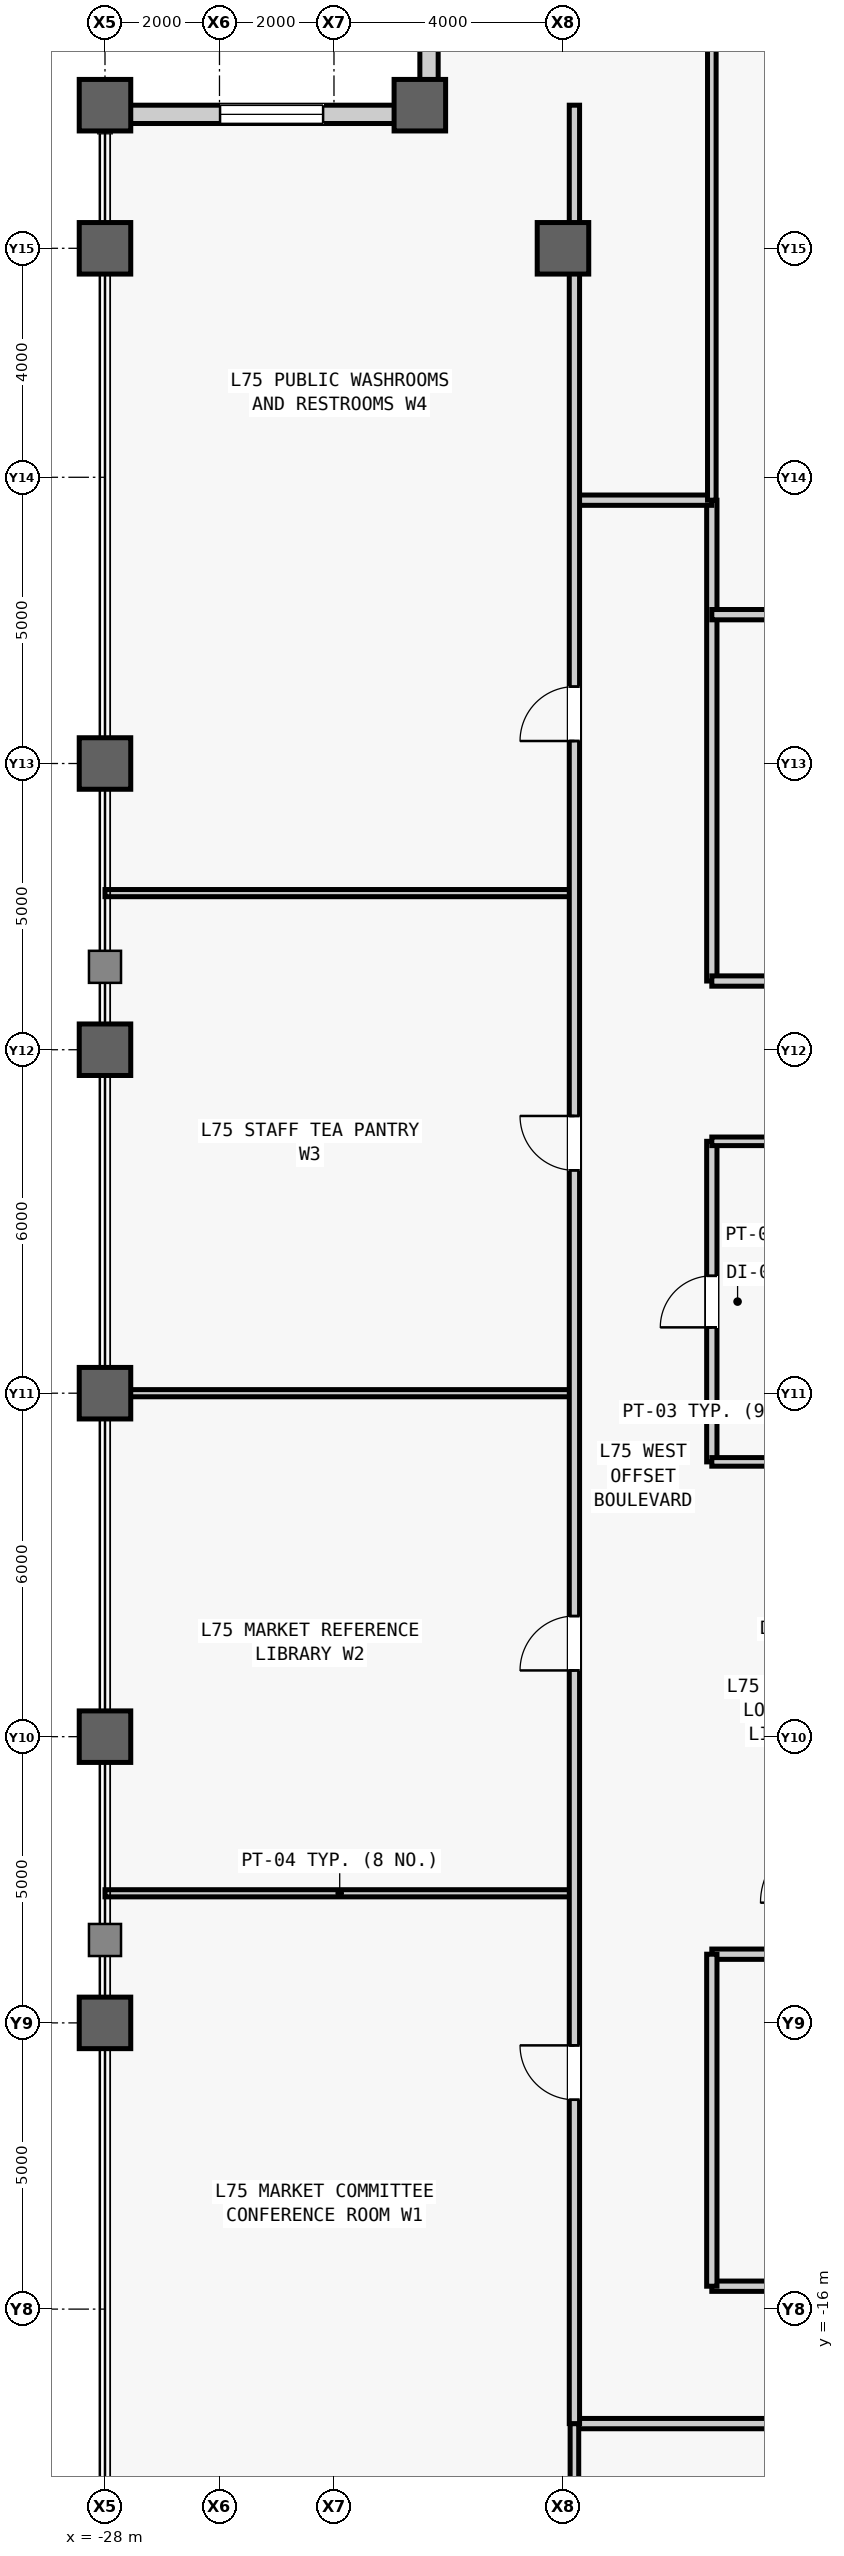
"""IFC4 building model, lengths in metres.
Left out: names, types, materials, properties, quantities, classifications, styles, units other than length and angle.
Written with IfcOpenShell. Run it as: python <this file> out.ifc"""

import sys

from ifc_helpers import new_model, si_unit, direction, frame, frame_2d, origin, origin_2d, place, context, subcontext, project, spatial, rectangle, hollow_rectangle, extrude, source, transform, mapped, element, fill, save


model = new_model("IFC4")
c1 = context("Model", 3, precision=1e-05, world=origin(), true_north=direction((0.0, 1.0)))
c2 = subcontext(c1, "Body", "Model", "MODEL_VIEW")
j1 = project(units=[si_unit("LENGTHUNIT", "METRE"), si_unit("PLANEANGLEUNIT", "RADIAN")], contexts=[c1])
p1 = place(None, origin())
s1 = spatial("IfcSite", under=j1, at=p1, CompositionType="ELEMENT")
p2 = place(p1, origin())
s2 = spatial("IfcBuilding", under=s1, at=p2, CompositionType="ELEMENT")
p3 = place(p2, frame((0.0, 0.0, 317.5)))
s3 = spatial("IfcBuildingStorey", under=s2, at=p3, CompositionType="ELEMENT", Elevation=317.5)
m1 = source(origin(), c2, "Body", "SweptSolid", [
    extrude(hollow_rectangle(XDim=0.9, YDim=0.9, WallThickness=0.05, at=origin_2d()), origin(), (0.0, 0.0, 1.0), 4.0),
])
for number, where, z_axis, x_axis in (
    (1, (-28.0, -11.0, 0.0), (0.0, 0.0, 1.0), (1.0, 0.0, 0.0)),
    (2, (-28.0, -6.0, 0.0), (0.0, 0.0, 1.0), (1.0, 0.0, 0.0)),
    (3, (-28.0, 0.0, 0.0), (0.0, 0.0, 1.0), (1.0, 0.0, 0.0)),
    (4, (-28.0, 6.0, 0.0), (0.0, 0.0, 1.0), (1.0, 0.0, 0.0)),
    (5, (-28.0, 11.0, 0.0), (0.0, 0.0, 1.0), (1.0, 0.0, 0.0)),
    (6, (-28.0, 20.0, 0.0), (0.0, 0.0, 1.0), (1.0, 0.0, 0.0)),
    (7, (-28.0, 22.5, 0.0), (0.0, 0.0, 1.0), (1.0, 0.0, 0.0)),
    (8, (-22.5, 22.5, 0.0), (0.0, 0.0, 1.0), (1.0, 0.0, 0.0)),
    (9, (-20.0, 20.0, 0.0), (0.0, 0.0, 1.0), (1.0, 0.0, 0.0)),
):
    element("IfcColumn", number, at=place(p3, frame(where, z_axis=z_axis, x_axis=x_axis)), inside=s3, PredefinedType="COLUMN", context=c2, shape_type="MappedRepresentation", body=[
        mapped(m1, transform((0.0, 0.0, 0.0), scale=1.0)),
    ])
m2 = source(origin(), c2, "Body", "SweptSolid", [
    extrude(rectangle(XDim=5.18, YDim=0.32, at=frame_2d((2.59, 0.0))), origin(), (0.0, 0.0, 1.0), 3.231),
])
p4 = place(p3, frame((-22.34, 22.5, 0.0), z_axis=(0.0, 0.0, 1.0), x_axis=(0.0, 1.0, 0.0)))
e10 = element("IfcWall", 10, at=p4, inside=s3, PredefinedType="STANDARD", context=c2, shape_type="MappedRepresentation", body=[
    mapped(m2, transform((0.0, 0.0, 0.0), scale=1.0)),
])
m3 = source(origin(), c2, "Body", "SweptSolid", [
    extrude(rectangle(XDim=1.8, YDim=2.4, at=frame_2d((0.9, 1.2))), frame((0.0, 0.17, 0.0), z_axis=(0.0, -1.0, 0.0), x_axis=(1.0, 0.0, 0.0)), (0.0, 0.0, 1.0), 0.34),
])
p5 = place(p4, frame((1.69, 0.0, 0.5)))
e11 = element("IfcOpeningElement", 11, at=p5, cuts=e10, PredefinedType="OPENING", context=c2, shape_type="MappedRepresentation", body=[
    mapped(m3, transform((0.0, 0.0, 0.0), scale=1.0)),
])
p6 = place(p3, frame((-22.5, 22.34, 0.0), z_axis=(0.0, 0.0, 1.0), x_axis=(-1.0, 0.0, 0.0)))
e12 = element("IfcWall", 12, at=p6, inside=s3, PredefinedType="STANDARD", context=c2, shape_type="MappedRepresentation", body=[
    mapped(m2, transform((0.0, 0.0, 0.0), scale=1.0)),
])
p7 = place(p6, frame((1.69, 0.0, 0.5)))
e13 = element("IfcOpeningElement", 13, at=p7, cuts=e12, PredefinedType="OPENING", context=c2, shape_type="MappedRepresentation", body=[
    mapped(m3, transform((0.0, 0.0, 0.0), scale=1.0)),
])
m4 = source(origin(), c2, "Body", "SweptSolid", [
    extrude(rectangle(XDim=5.6, YDim=0.18, at=frame_2d((2.8, 0.0))), origin(), (0.0, 0.0, 1.0), 3.78),
])
p8 = place(p3, frame((-17.4, -1.2, 0.0), z_axis=(0.0, 0.0, 1.0), x_axis=(0.0, 1.0, 0.0)))
e14 = element("IfcWall", 14, at=p8, inside=s3, PredefinedType="PARTITIONING", context=c2, shape_type="MappedRepresentation", body=[
    mapped(m4, transform((0.0, 0.0, 0.0), scale=1.0)),
])
m5 = source(origin(), c2, "Body", "SweptSolid", [
    extrude(rectangle(XDim=0.9, YDim=2.15, at=frame_2d((0.45, 1.075))), frame((0.0, 0.1, 0.0), z_axis=(0.0, -1.0, 0.0), x_axis=(1.0, 0.0, 0.0)), (0.0, 0.0, 1.0), 0.2),
])
p9 = place(p8, frame((2.35, 0.0, 0.0)))
e15 = element("IfcOpeningElement", 15, at=p9, cuts=e14, PredefinedType="OPENING", context=c2, shape_type="MappedRepresentation", body=[
    mapped(m5, transform((0.0, 0.0, 0.0), scale=1.0)),
])
m6 = source(origin(), c2, "Body", "SweptSolid", [
    extrude(rectangle(XDim=2.05, YDim=0.15, at=frame_2d((1.025, 0.0))), origin(), (0.0, 0.0, 1.0), 3.78),
])
for number, where, z_axis, x_axis in (
    (16, (-17.4, -1.2, 0.0), (0.0, 0.0, 1.0), (1.0, 0.0, 0.0)),
    (17, (-17.4, 4.4, 0.0), (0.0, 0.0, 1.0), (1.0, 0.0, 0.0)),
):
    element("IfcWall", number, at=place(p3, frame(where, z_axis=z_axis, x_axis=x_axis)), inside=s3, PredefinedType="PARTITIONING", context=c2, shape_type="MappedRepresentation", body=[
        mapped(m6, transform((0.0, 0.0, 0.0), scale=1.0)),
    ])
m7 = source(origin(), c2, "Body", "SweptSolid", [
    extrude(rectangle(XDim=2.05, YDim=0.18, at=frame_2d((1.025, 0.0))), origin(), (0.0, 0.0, 1.0), 3.78),
])
p10 = place(p3, frame((-17.4, -9.8, 0.0), z_axis=(0.0, 0.0, 1.0), x_axis=(1.0, 0.0, 0.0)))
e18 = element("IfcWall", 18, at=p10, inside=s3, PredefinedType="PARTITIONING", context=c2, shape_type="MappedRepresentation", body=[
    mapped(m7, transform((0.0, 0.0, 0.0), scale=1.0)),
])
m8 = source(origin(), c2, "Body", "SweptSolid", [
    extrude(rectangle(XDim=8.4, YDim=0.18, at=frame_2d((4.2, 0.0))), origin(), (0.0, 0.0, 1.0), 3.78),
])
p11 = place(p3, frame((-17.4, 7.2, 0.0), z_axis=(0.0, 0.0, 1.0), x_axis=(0.0, 1.0, 0.0)))
e19 = element("IfcWall", 19, at=p11, inside=s3, PredefinedType="PARTITIONING", context=c2, shape_type="MappedRepresentation", body=[
    mapped(m8, transform((0.0, 0.0, 0.0), scale=1.0)),
])
p12 = place(p3, frame((-17.4, 7.2, 0.0), z_axis=(0.0, 0.0, 1.0), x_axis=(1.0, 0.0, 0.0)))
e20 = element("IfcWall", 20, at=p12, inside=s3, PredefinedType="PARTITIONING", context=c2, shape_type="MappedRepresentation", body=[
    mapped(m7, transform((0.0, 0.0, 0.0), scale=1.0)),
])
m9 = source(origin(), c2, "Body", "SweptSolid", [
    extrude(rectangle(XDim=16.1, YDim=0.18, at=frame_2d((8.05, 0.0))), origin(), (0.0, 0.0, 1.0), 3.78),
])
p13 = place(p3, frame((-17.4, -15.6, 0.0), z_axis=(0.0, 0.0, 1.0), x_axis=(1.0, 0.0, 0.0)))
e21 = element("IfcWall", 21, at=p13, inside=s3, PredefinedType="PARTITIONING", context=c2, shape_type="MappedRepresentation", body=[
    mapped(m9, transform((0.0, 0.0, 0.0), scale=1.0)),
])
p14 = place(p13, frame((8.95, 0.0, 0.0)))
e22 = element("IfcOpeningElement", 22, at=p14, cuts=e21, PredefinedType="OPENING", context=c2, shape_type="MappedRepresentation", body=[
    mapped(m5, transform((0.0, 0.0, 0.0), scale=1.0)),
])
m10 = source(origin(), c2, "Body", "SweptSolid", [
    extrude(rectangle(XDim=5.8, YDim=0.18, at=frame_2d((2.9, 0.0))), origin(), (0.0, 0.0, 1.0), 3.78),
])
p15 = place(p3, frame((-17.4, -15.6, 0.0), z_axis=(0.0, 0.0, 1.0), x_axis=(0.0, 1.0, 0.0)))
e23 = element("IfcWall", 23, at=p15, inside=s3, PredefinedType="PARTITIONING", context=c2, shape_type="MappedRepresentation", body=[
    mapped(m10, transform((0.0, 0.0, 0.0), scale=1.0)),
])
m11 = source(origin(), c2, "Body", "SweptSolid", [
    extrude(rectangle(XDim=2.4, YDim=0.18, at=frame_2d((1.2, 0.0))), origin(), (0.0, 0.0, 1.0), 3.78),
])
p16 = place(p3, frame((-19.8, 15.6, 0.0), z_axis=(0.0, 0.0, 1.0), x_axis=(1.0, 0.0, 0.0)))
e24 = element("IfcWall", 24, at=p16, inside=s3, PredefinedType="PARTITIONING", context=c2, shape_type="MappedRepresentation", body=[
    mapped(m11, transform((0.0, 0.0, 0.0), scale=1.0)),
])
m12 = source(origin(), c2, "Body", "SweptSolid", [
    extrude(rectangle(XDim=37.55, YDim=0.18, at=frame_2d((18.775, 0.0))), origin(), (0.0, 0.0, 1.0), 3.78),
])
p17 = place(p3, frame((-19.8, -18.0, 0.0), z_axis=(0.0, 0.0, 1.0), x_axis=(1.0, 0.0, 0.0)))
e25 = element("IfcWall", 25, at=p17, inside=s3, PredefinedType="PARTITIONING", context=c2, shape_type="MappedRepresentation", body=[
    mapped(m12, transform((0.0, 0.0, 0.0), scale=1.0)),
])
m13 = source(origin(), c2, "Body", "SweptSolid", [
    extrude(rectangle(XDim=1.05, YDim=2.2, at=frame_2d((0.525, 1.1))), frame((0.0, 0.1, 0.0), z_axis=(0.0, -1.0, 0.0), x_axis=(1.0, 0.0, 0.0)), (0.0, 0.0, 1.0), 0.2),
])
p18 = place(p17, frame((5.983, 0.0, 0.0)))
e26 = element("IfcOpeningElement", 26, at=p18, cuts=e25, PredefinedType="OPENING", context=c2, shape_type="MappedRepresentation", body=[
    mapped(m13, transform((0.0, 0.0, 0.0), scale=1.0)),
])
p19 = place(p17, frame((17.875, 0.0, 0.0)))
e27 = element("IfcOpeningElement", 27, at=p19, cuts=e25, PredefinedType="OPENING", context=c2, shape_type="MappedRepresentation", body=[
    mapped(m13, transform((0.0, 0.0, 0.0), scale=1.0)),
])
p20 = place(p17, frame((30.116, 0.0, 0.0)))
e28 = element("IfcOpeningElement", 28, at=p20, cuts=e25, PredefinedType="OPENING", context=c2, shape_type="MappedRepresentation", body=[
    mapped(m13, transform((0.0, 0.0, 0.0), scale=1.0)),
])
m14 = source(origin(), c2, "Body", "SweptSolid", [
    extrude(rectangle(XDim=10.0, YDim=0.15, at=frame_2d((5.0, 0.0))), origin(), (0.0, 0.0, 1.0), 3.164),
])
p21 = place(p3, frame((-19.8, -28.0, 0.0), z_axis=(0.0, 0.0, 1.0), x_axis=(0.0, 1.0, 0.0)))
e29 = element("IfcWall", 29, at=p21, inside=s3, PredefinedType="PARTITIONING", context=c2, shape_type="MappedRepresentation", body=[
    mapped(m14, transform((0.0, 0.0, 0.0), scale=1.0)),
])
m15 = source(origin(), c2, "Body", "SweptSolid", [
    extrude(rectangle(XDim=32.75, YDim=0.18, at=frame_2d((16.375, 0.0))), origin(), (0.0, 0.0, 1.0), 3.78),
])
p22 = place(p3, frame((-17.4, 13.6, 0.0), z_axis=(0.0, 0.0, 1.0), x_axis=(1.0, 0.0, 0.0)))
e30 = element("IfcWall", 30, at=p22, inside=s3, PredefinedType="PARTITIONING", context=c2, shape_type="MappedRepresentation", body=[
    mapped(m15, transform((0.0, 0.0, 0.0), scale=1.0)),
])
p23 = place(p22, frame((27.075, 0.0, 0.0)))
e31 = element("IfcOpeningElement", 31, at=p23, cuts=e30, PredefinedType="OPENING", context=c2, shape_type="MappedRepresentation", body=[
    mapped(m13, transform((0.0, 0.0, 0.0), scale=1.0)),
])
m16 = source(origin(), c2, "Body", "SweptSolid", [
    extrude(rectangle(XDim=12.4, YDim=0.15, at=frame_2d((6.2, 0.0))), origin(), (0.0, 0.0, 1.0), 3.78),
])
p24 = place(p3, frame((-17.4, 15.6, 0.0), z_axis=(0.0, 0.0, 1.0), x_axis=(0.0, 1.0, 0.0)))
e32 = element("IfcWall", 32, at=p24, inside=s3, PredefinedType="PARTITIONING", context=c2, shape_type="MappedRepresentation", body=[
    mapped(m16, transform((0.0, 0.0, 0.0), scale=1.0)),
])
m17 = source(origin(), c2, "Body", "SweptSolid", [
    extrude(rectangle(XDim=8.2, YDim=0.125, at=frame_2d((4.1, 0.0))), origin(), (0.0, 0.0, 1.0), 3.78),
])
p25 = place(p3, frame((-28.0, -8.736, 0.0), z_axis=(0.0, 0.0, 1.0), x_axis=(1.0, 0.0, 0.0)))
e33 = element("IfcWall", 33, at=p25, inside=s3, PredefinedType="PARTITIONING", context=c2, shape_type="MappedRepresentation", body=[
    mapped(m17, transform((0.0, 0.0, 0.0), scale=1.0)),
])
m18 = source(origin(), c2, "Body", "SweptSolid", [
    extrude(rectangle(XDim=8.2, YDim=0.125, at=frame_2d((4.1, 0.0))), origin(), (0.0, 0.0, 1.0), 3.085),
])
p26 = place(p3, frame((-28.0, 0.0, 0.0), z_axis=(0.0, 0.0, 1.0), x_axis=(1.0, 0.0, 0.0)))
e34 = element("IfcWall", 34, at=p26, inside=s3, PredefinedType="PARTITIONING", context=c2, shape_type="MappedRepresentation", body=[
    mapped(m18, transform((0.0, 0.0, 0.0), scale=1.0)),
])
p27 = place(p3, frame((-28.0, 8.736, 0.0), z_axis=(0.0, 0.0, 1.0), x_axis=(1.0, 0.0, 0.0)))
e35 = element("IfcWall", 35, at=p27, inside=s3, PredefinedType="PARTITIONING", context=c2, shape_type="MappedRepresentation", body=[
    mapped(m17, transform((0.0, 0.0, 0.0), scale=1.0)),
])
m19 = source(origin(), c2, "Body", "SweptSolid", [
    extrude(rectangle(XDim=40.5, YDim=0.18, at=frame_2d((20.25, 0.0))), origin(), (0.0, 0.0, 1.0), 3.164),
])
p28 = place(p3, frame((-19.8, -18.0, 0.0), z_axis=(0.0, 0.0, 1.0), x_axis=(0.0, 1.0, 0.0)))
e36 = element("IfcWall", 36, at=p28, inside=s3, PredefinedType="PARTITIONING", context=c2, shape_type="MappedRepresentation", body=[
    mapped(m19, transform((0.0, 0.0, 0.0), scale=1.0)),
])
m20 = source(origin(), c2, "Body", "SweptSolid", [
    extrude(rectangle(XDim=0.95, YDim=2.15, at=frame_2d((0.475, 1.075))), frame((0.0, 0.1, 0.0), z_axis=(0.0, -1.0, 0.0), x_axis=(1.0, 0.0, 0.0)), (0.0, 0.0, 1.0), 0.2),
])
p29 = place(p28, frame((5.657, 0.0, 0.0)))
e37 = element("IfcOpeningElement", 37, at=p29, cuts=e36, PredefinedType="OPENING", context=c2, shape_type="MappedRepresentation", body=[
    mapped(m20, transform((0.0, 0.0, 0.0), scale=1.0)),
])
p30 = place(p28, frame((13.157, 0.0, 0.0)))
e38 = element("IfcOpeningElement", 38, at=p30, cuts=e36, PredefinedType="OPENING", context=c2, shape_type="MappedRepresentation", body=[
    mapped(m20, transform((0.0, 0.0, 0.0), scale=1.0)),
])
p31 = place(p28, frame((21.893, 0.0, 0.0)))
e39 = element("IfcOpeningElement", 39, at=p31, cuts=e36, PredefinedType="OPENING", context=c2, shape_type="MappedRepresentation", body=[
    mapped(m20, transform((0.0, 0.0, 0.0), scale=1.0)),
])
p32 = place(p28, frame((29.393, 0.0, 0.0)))
e40 = element("IfcOpeningElement", 40, at=p32, cuts=e36, PredefinedType="OPENING", context=c2, shape_type="MappedRepresentation", body=[
    mapped(m20, transform((0.0, 0.0, 0.0), scale=1.0)),
])
m21 = source(origin(), c2, "Body", "SweptSolid", [
    extrude(rectangle(XDim=1.8, YDim=2.4, at=frame_2d((0.9, 1.2))), frame((0.0, 0.03, 0.0), z_axis=(0.0, -1.0, 0.0), x_axis=(1.0, 0.0, 0.0)), (0.0, 0.0, 1.0), 0.06),
])
p33 = place(p7, origin())
e41 = element("IfcWindow", 41, at=p33, inside=s3, PartitioningType="SINGLE_PANEL", PredefinedType="WINDOW", context=c2, shape_type="MappedRepresentation", body=[
    mapped(m21, transform((0.0, 0.0, 0.0), scale=1.0)),
])
fill(e13, e41)
m22 = source(origin(), c2, "Body", "SweptSolid", [
    extrude(rectangle(XDim=0.9, YDim=2.15, at=frame_2d((0.45, 1.075))), frame((0.0, 0.025, 0.0), z_axis=(0.0, -1.0, 0.0), x_axis=(1.0, 0.0, 0.0)), (0.0, 0.0, 1.0), 0.05),
])
p34 = place(p9, origin())
e42 = element("IfcDoor", 42, at=p34, inside=s3, OperationType="SINGLE_SWING_LEFT", PredefinedType="DOOR", context=c2, shape_type="MappedRepresentation", body=[
    mapped(m22, transform((0.0, 0.0, 0.0), scale=1.0)),
])
fill(e15, e42)
m23 = source(origin(), c2, "Body", "SweptSolid", [
    extrude(rectangle(XDim=0.95, YDim=2.15, at=frame_2d((0.475, 1.075))), frame((0.0, 0.025, 0.0), z_axis=(0.0, -1.0, 0.0), x_axis=(1.0, 0.0, 0.0)), (0.0, 0.0, 1.0), 0.05),
])
p35 = place(p29, origin())
e43 = element("IfcDoor", 43, at=p35, inside=s3, OperationType="SINGLE_SWING_RIGHT", PredefinedType="DOOR", context=c2, shape_type="MappedRepresentation", body=[
    mapped(m23, transform((0.0, 0.0, 0.0), scale=1.0)),
])
fill(e37, e43)
p36 = place(p30, origin())
e44 = element("IfcDoor", 44, at=p36, inside=s3, OperationType="SINGLE_SWING_LEFT", PredefinedType="DOOR", context=c2, shape_type="MappedRepresentation", body=[
    mapped(m23, transform((0.0, 0.0, 0.0), scale=1.0)),
])
fill(e38, e44)
p37 = place(p31, origin())
e45 = element("IfcDoor", 45, at=p37, inside=s3, OperationType="SINGLE_SWING_RIGHT", PredefinedType="DOOR", context=c2, shape_type="MappedRepresentation", body=[
    mapped(m23, transform((0.0, 0.0, 0.0), scale=1.0)),
])
fill(e39, e45)
p38 = place(p32, origin())
e46 = element("IfcDoor", 46, at=p38, inside=s3, OperationType="SINGLE_SWING_LEFT", PredefinedType="DOOR", context=c2, shape_type="MappedRepresentation", body=[
    mapped(m23, transform((0.0, 0.0, 0.0), scale=1.0)),
])
fill(e40, e46)
save(model, sys.argv[1])
